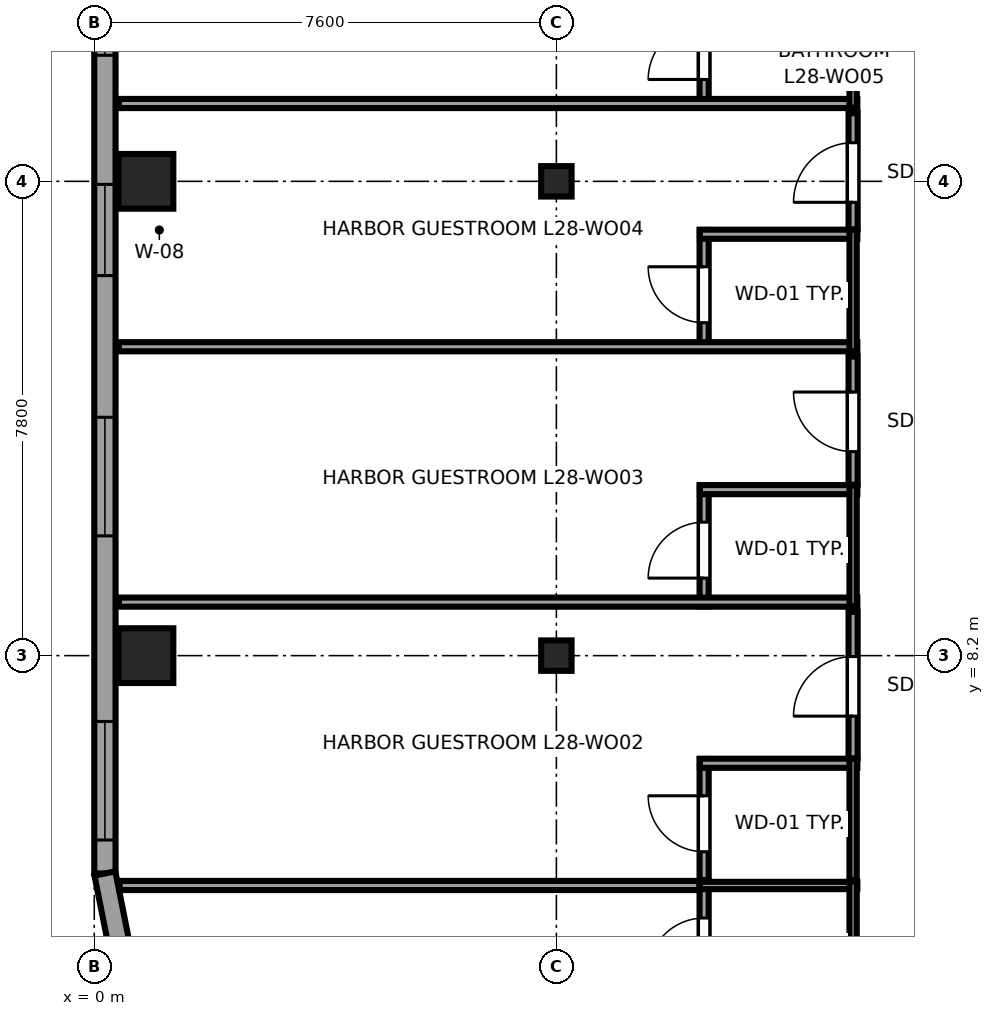
"""IFC4 building model, lengths in metres.
Left out: names, types, materials, properties, quantities, classifications, styles, units other than length and angle.
Written with IfcOpenShell. Run it as: python <this file> out.ifc"""

import sys

from ifc_helpers import new_model, si_unit, direction, frame, frame_2d, origin, origin_2d, place, context, subcontext, project, spatial, rectangle, i_section, extrude, source, transform, mapped, element, fill, save


model = new_model("IFC4")
c1 = context("Model", 3, precision=1e-05, world=origin(), true_north=direction((0.0, 1.0)))
c2 = subcontext(c1, "Body", "Model", "MODEL_VIEW")
j1 = project(units=[si_unit("LENGTHUNIT", "METRE"), si_unit("PLANEANGLEUNIT", "RADIAN")], contexts=[c1])
p1 = place(None, origin())
s1 = spatial("IfcSite", under=j1, at=p1, CompositionType="ELEMENT")
p2 = place(p1, origin())
s2 = spatial("IfcBuilding", under=s1, at=p2, CompositionType="ELEMENT")
p3 = place(p2, frame((0.0, 0.0, 111.55)))
s3 = spatial("IfcBuildingStorey", under=s2, at=p3, CompositionType="ELEMENT", Elevation=111.55)
m1 = source(origin(), c2, "Body", "SweptSolid", [
    extrude(rectangle(XDim=0.9, YDim=0.9, at=origin_2d()), origin(), (0.0, 0.0, 1.0), 3.55),
])
for number, where, z_axis, x_axis in (
    (1, (0.85, 8.2, 0.0), (0.0, 0.0, 1.0), (1.0, 0.0, 0.0)),
    (2, (0.85, 16.0, 0.0), (0.0, 0.0, 1.0), (1.0, 0.0, 0.0)),
):
    element("IfcColumn", number, at=place(p3, frame(where, z_axis=z_axis, x_axis=x_axis)), inside=s3, PredefinedType="COLUMN", context=c2, shape_type="MappedRepresentation", body=[
        mapped(m1, transform((0.0, 0.0, 0.0), x_axis=(1.0, 0.0, 0.0), y_axis=(0.0, 1.0, 0.0), z_axis=(0.0, 0.0, 1.0), scale=1.0)),
    ])
m2 = source(origin(), c2, "Body", "SweptSolid", [
    extrude(i_section(OverallWidth=0.5, OverallDepth=0.5, WebThickness=0.022, FlangeThickness=0.034, at=origin_2d()), origin(), (0.0, 0.0, 1.0), 3.55),
])
for number, where, z_axis, x_axis in (
    (3, (7.6, 8.2, 0.0), (0.0, 0.0, 1.0), (1.0, 0.0, 0.0)),
    (4, (7.6, 16.0, 0.0), (0.0, 0.0, 1.0), (1.0, 0.0, 0.0)),
):
    element("IfcColumn", number, at=place(p3, frame(where, z_axis=z_axis, x_axis=x_axis)), inside=s3, PredefinedType="COLUMN", context=c2, shape_type="MappedRepresentation", body=[
        mapped(m2, transform((0.0, 0.0, 0.0), x_axis=(1.0, 0.0, 0.0), y_axis=(0.0, 1.0, 0.0), z_axis=(0.0, 0.0, 1.0), scale=1.0)),
    ])
p4 = place(p3, frame((0.175, 41.383, 0.0), z_axis=(0.0, 0.0, 1.0), x_axis=(0.0, -1.0, 0.0)))
e5 = element("IfcWall", 5, at=p4, inside=s3, PredefinedType="SOLIDWALL", context=c2, shape_type="SweptSolid", body=[
    extrude(rectangle(XDim=36.766, YDim=0.35, at=frame_2d((18.383, 0.0))), origin(), (0.0, 0.0, 1.0), 3.37),
])
p5 = place(p4, frame((0.551, 0.0, 0.68)))
e6 = element("IfcOpeningElement", 6, at=p5, cuts=e5, PredefinedType="OPENING", context=c2, shape_type="SweptSolid", body=[
    extrude(rectangle(XDim=1.95, YDim=1.82, at=frame_2d((0.975, 0.91))), frame((0.0, 0.185, 0.0), z_axis=(0.0, -1.0, 0.0), x_axis=(1.0, 0.0, 0.0)), (0.0, 0.0, 1.0), 0.37),
])
p6 = place(p4, frame((4.503, 0.0, 0.68)))
e7 = element("IfcOpeningElement", 7, at=p6, cuts=e5, PredefinedType="OPENING", context=c2, shape_type="SweptSolid", body=[
    extrude(rectangle(XDim=1.95, YDim=1.82, at=frame_2d((0.975, 0.91))), frame((0.0, 0.185, 0.0), z_axis=(0.0, -1.0, 0.0), x_axis=(1.0, 0.0, 0.0)), (0.0, 0.0, 1.0), 0.37),
])
p7 = place(p4, frame((10.554, 0.0, 0.68)))
e8 = element("IfcOpeningElement", 8, at=p7, cuts=e5, PredefinedType="OPENING", context=c2, shape_type="SweptSolid", body=[
    extrude(rectangle(XDim=1.95, YDim=1.82, at=frame_2d((0.975, 0.91))), frame((0.0, 0.185, 0.0), z_axis=(0.0, -1.0, 0.0), x_axis=(1.0, 0.0, 0.0)), (0.0, 0.0, 1.0), 0.37),
])
p8 = place(p4, frame((13.456, 0.0, 0.68)))
e9 = element("IfcOpeningElement", 9, at=p8, cuts=e5, PredefinedType="OPENING", context=c2, shape_type="SweptSolid", body=[
    extrude(rectangle(XDim=1.95, YDim=1.82, at=frame_2d((0.975, 0.91))), frame((0.0, 0.185, 0.0), z_axis=(0.0, -1.0, 0.0), x_axis=(1.0, 0.0, 0.0)), (0.0, 0.0, 1.0), 0.37),
])
p9 = place(p4, frame((21.36, 0.0, 0.68)))
e10 = element("IfcOpeningElement", 10, at=p9, cuts=e5, PredefinedType="OPENING", context=c2, shape_type="SweptSolid", body=[
    extrude(rectangle(XDim=1.95, YDim=1.82, at=frame_2d((0.975, 0.91))), frame((0.0, 0.185, 0.0), z_axis=(0.0, -1.0, 0.0), x_axis=(1.0, 0.0, 0.0)), (0.0, 0.0, 1.0), 0.37),
])
p10 = place(p4, frame((29.263, 0.0, 0.68)))
e11 = element("IfcOpeningElement", 11, at=p10, cuts=e5, PredefinedType="OPENING", context=c2, shape_type="SweptSolid", body=[
    extrude(rectangle(XDim=1.95, YDim=1.82, at=frame_2d((0.975, 0.91))), frame((0.0, 0.185, 0.0), z_axis=(0.0, -1.0, 0.0), x_axis=(1.0, 0.0, 0.0)), (0.0, 0.0, 1.0), 0.37),
])
p11 = place(p4, frame((34.265, 0.0, 0.68)))
e12 = element("IfcOpeningElement", 12, at=p11, cuts=e5, PredefinedType="OPENING", context=c2, shape_type="SweptSolid", body=[
    extrude(rectangle(XDim=1.95, YDim=1.82, at=frame_2d((0.975, 0.91))), frame((0.0, 0.185, 0.0), z_axis=(0.0, -1.0, 0.0), x_axis=(1.0, 0.0, 0.0)), (0.0, 0.0, 1.0), 0.37),
])
p12 = place(p4, frame((25.433, 0.0, 0.62)))
e13 = element("IfcOpeningElement", 13, at=p12, cuts=e5, PredefinedType="OPENING", context=c2, shape_type="SweptSolid", body=[
    extrude(rectangle(XDim=1.5, YDim=1.55, at=frame_2d((0.75, 0.775))), frame((0.0, 0.185, 0.0), z_axis=(0.0, -1.0, 0.0), x_axis=(1.0, 0.0, 0.0)), (0.0, 0.0, 1.0), 0.37),
])
p13 = place(p3, frame((0.175, 4.617, 0.0), z_axis=(0.0, 0.0, 1.0), x_axis=(0.195011420161, -0.980800971659, 0.0)))
e14 = element("IfcWall", 14, at=p13, inside=s3, PredefinedType="SOLIDWALL", context=c2, shape_type="SweptSolid", body=[
    extrude(rectangle(XDim=1.743, YDim=0.35, at=frame_2d((0.871, 0.0))), origin(), (0.0, 0.0, 1.0), 3.37),
])
p14 = place(p3, frame((10.03, 2.5, 0.0), z_axis=(0.0, 0.0, 1.0), x_axis=(0.0, 1.0, 0.0)))
e15 = element("IfcWall", 15, at=p14, inside=s3, PredefinedType="PARTITIONING", context=c2, shape_type="SweptSolid", body=[
    extrude(rectangle(XDim=1.99, YDim=0.15, at=frame_2d((0.995, 0.0))), origin(), (0.0, 0.0, 1.0), 3.37),
])
p15 = place(p14, frame((0.465, 0.0, 0.0)))
e16 = element("IfcOpeningElement", 16, at=p15, cuts=e15, PredefinedType="OPENING", context=c2, shape_type="SweptSolid", body=[
    extrude(rectangle(XDim=0.92, YDim=2.01, at=frame_2d((0.46, 1.005))), frame((0.0, 0.085, 0.0), z_axis=(0.0, -1.0, 0.0), x_axis=(1.0, 0.0, 0.0)), (0.0, 0.0, 1.0), 0.17),
])
p16 = place(p3, frame((9.96, 4.42, 0.0), z_axis=(0.0, 0.0, 1.0), x_axis=(1.0, 0.0, 0.0)))
e17 = element("IfcWall", 17, at=p16, inside=s3, PredefinedType="PLUMBINGWALL", context=c2, shape_type="SweptSolid", body=[
    extrude(rectangle(XDim=2.59, YDim=0.12, at=frame_2d((1.295, 0.0))), origin(), (0.0, 0.0, 1.0), 3.37),
])
p17 = place(p3, frame((12.48, 2.5, 0.0), z_axis=(0.0, 0.0, 1.0), x_axis=(0.0, 1.0, 0.0)))
e18 = element("IfcWall", 18, at=p17, inside=s3, PredefinedType="PLUMBINGWALL", context=c2, shape_type="SweptSolid", body=[
    extrude(rectangle(XDim=1.99, YDim=0.12, at=frame_2d((0.995, 0.0))), origin(), (0.0, 0.0, 1.0), 3.37),
])
p18 = place(p3, frame((10.03, 4.51, 0.0), z_axis=(0.0, 0.0, 1.0), x_axis=(0.0, 1.0, 0.0)))
e19 = element("IfcWall", 19, at=p18, inside=s3, PredefinedType="PARTITIONING", context=c2, shape_type="SweptSolid", body=[
    extrude(rectangle(XDim=1.99, YDim=0.15, at=frame_2d((0.995, 0.0))), origin(), (0.0, 0.0, 1.0), 3.37),
])
p19 = place(p18, frame((0.465, 0.0, 0.0)))
e20 = element("IfcOpeningElement", 20, at=p19, cuts=e19, PredefinedType="OPENING", context=c2, shape_type="SweptSolid", body=[
    extrude(rectangle(XDim=0.92, YDim=2.01, at=frame_2d((0.46, 1.005))), frame((0.0, 0.085, 0.0), z_axis=(0.0, -1.0, 0.0), x_axis=(1.0, 0.0, 0.0)), (0.0, 0.0, 1.0), 0.17),
])
p20 = place(p3, frame((9.96, 6.43, 0.0), z_axis=(0.0, 0.0, 1.0), x_axis=(1.0, 0.0, 0.0)))
e21 = element("IfcWall", 21, at=p20, inside=s3, PredefinedType="PARTITIONING", context=c2, shape_type="SweptSolid", body=[
    extrude(rectangle(XDim=2.59, YDim=0.15, at=frame_2d((1.295, 0.0))), origin(), (0.0, 0.0, 1.0), 3.37),
])
p21 = place(p3, frame((12.48, 4.51, 0.0), z_axis=(0.0, 0.0, 1.0), x_axis=(0.0, 1.0, 0.0)))
e22 = element("IfcWall", 22, at=p21, inside=s3, PredefinedType="PLUMBINGWALL", context=c2, shape_type="SweptSolid", body=[
    extrude(rectangle(XDim=1.99, YDim=0.12, at=frame_2d((0.995, 0.0))), origin(), (0.0, 0.0, 1.0), 3.37),
])
p22 = place(p3, frame((10.03, 9.01, 0.0), z_axis=(0.0, 0.0, 1.0), x_axis=(0.0, 1.0, 0.0)))
e23 = element("IfcWall", 23, at=p22, inside=s3, PredefinedType="PARTITIONING", context=c2, shape_type="SweptSolid", body=[
    extrude(rectangle(XDim=1.99, YDim=0.15, at=frame_2d((0.995, 0.0))), origin(), (0.0, 0.0, 1.0), 3.37),
])
p23 = place(p22, frame((0.465, 0.0, 0.0)))
e24 = element("IfcOpeningElement", 24, at=p23, cuts=e23, PredefinedType="OPENING", context=c2, shape_type="SweptSolid", body=[
    extrude(rectangle(XDim=0.92, YDim=2.01, at=frame_2d((0.46, 1.005))), frame((0.0, 0.085, 0.0), z_axis=(0.0, -1.0, 0.0), x_axis=(1.0, 0.0, 0.0)), (0.0, 0.0, 1.0), 0.17),
])
p24 = place(p3, frame((0.405, 9.08, 0.0), z_axis=(0.0, 0.0, 1.0), x_axis=(1.0, 0.0, 0.0)))
e25 = element("IfcWall", 25, at=p24, inside=s3, PredefinedType="PARTITIONING", context=c2, shape_type="SweptSolid", body=[
    extrude(rectangle(XDim=12.145, YDim=0.15, at=frame_2d((6.073, 0.0))), origin(), (0.0, 0.0, 1.0), 3.37),
])
p25 = place(p3, frame((9.96, 10.93, 0.0), z_axis=(0.0, 0.0, 1.0), x_axis=(1.0, 0.0, 0.0)))
e26 = element("IfcWall", 26, at=p25, inside=s3, PredefinedType="PARTITIONING", context=c2, shape_type="SweptSolid", body=[
    extrude(rectangle(XDim=2.59, YDim=0.15, at=frame_2d((1.295, 0.0))), origin(), (0.0, 0.0, 1.0), 3.37),
])
p26 = place(p3, frame((12.48, 9.01, 0.0), z_axis=(0.0, 0.0, 1.0), x_axis=(0.0, 1.0, 0.0)))
e27 = element("IfcWall", 27, at=p26, inside=s3, PredefinedType="PLUMBINGWALL", context=c2, shape_type="SweptSolid", body=[
    extrude(rectangle(XDim=1.99, YDim=0.12, at=frame_2d((0.995, 0.0))), origin(), (0.0, 0.0, 1.0), 3.37),
])
p27 = place(p3, frame((10.03, 13.21, 0.0), z_axis=(0.0, 0.0, 1.0), x_axis=(0.0, 1.0, 0.0)))
e28 = element("IfcWall", 28, at=p27, inside=s3, PredefinedType="PARTITIONING", context=c2, shape_type="SweptSolid", body=[
    extrude(rectangle(XDim=1.99, YDim=0.15, at=frame_2d((0.995, 0.0))), origin(), (0.0, 0.0, 1.0), 3.37),
])
p28 = place(p27, frame((0.465, 0.0, 0.0)))
e29 = element("IfcOpeningElement", 29, at=p28, cuts=e28, PredefinedType="OPENING", context=c2, shape_type="SweptSolid", body=[
    extrude(rectangle(XDim=0.92, YDim=2.01, at=frame_2d((0.46, 1.005))), frame((0.0, 0.085, 0.0), z_axis=(0.0, -1.0, 0.0), x_axis=(1.0, 0.0, 0.0)), (0.0, 0.0, 1.0), 0.17),
])
p29 = place(p3, frame((0.405, 13.28, 0.0), z_axis=(0.0, 0.0, 1.0), x_axis=(1.0, 0.0, 0.0)))
e30 = element("IfcWall", 30, at=p29, inside=s3, PredefinedType="PARTITIONING", context=c2, shape_type="SweptSolid", body=[
    extrude(rectangle(XDim=12.145, YDim=0.15, at=frame_2d((6.073, 0.0))), origin(), (0.0, 0.0, 1.0), 3.37),
])
p30 = place(p3, frame((9.96, 15.13, 0.0), z_axis=(0.0, 0.0, 1.0), x_axis=(1.0, 0.0, 0.0)))
e31 = element("IfcWall", 31, at=p30, inside=s3, PredefinedType="PARTITIONING", context=c2, shape_type="SweptSolid", body=[
    extrude(rectangle(XDim=2.59, YDim=0.15, at=frame_2d((1.295, 0.0))), origin(), (0.0, 0.0, 1.0), 3.37),
])
p31 = place(p3, frame((12.48, 13.21, 0.0), z_axis=(0.0, 0.0, 1.0), x_axis=(0.0, 1.0, 0.0)))
e32 = element("IfcWall", 32, at=p31, inside=s3, PredefinedType="PLUMBINGWALL", context=c2, shape_type="SweptSolid", body=[
    extrude(rectangle(XDim=1.99, YDim=0.12, at=frame_2d((0.995, 0.0))), origin(), (0.0, 0.0, 1.0), 3.37),
])
p32 = place(p3, frame((10.03, 17.21, 0.0), z_axis=(0.0, 0.0, 1.0), x_axis=(0.0, 1.0, 0.0)))
e33 = element("IfcWall", 33, at=p32, inside=s3, PredefinedType="PARTITIONING", context=c2, shape_type="SweptSolid", body=[
    extrude(rectangle(XDim=1.99, YDim=0.15, at=frame_2d((0.995, 0.0))), origin(), (0.0, 0.0, 1.0), 3.37),
])
p33 = place(p32, frame((0.465, 0.0, 0.0)))
e34 = element("IfcOpeningElement", 34, at=p33, cuts=e33, PredefinedType="OPENING", context=c2, shape_type="SweptSolid", body=[
    extrude(rectangle(XDim=0.92, YDim=2.01, at=frame_2d((0.46, 1.005))), frame((0.0, 0.085, 0.0), z_axis=(0.0, -1.0, 0.0), x_axis=(1.0, 0.0, 0.0)), (0.0, 0.0, 1.0), 0.17),
])
p34 = place(p3, frame((0.405, 17.28, 0.0), z_axis=(0.0, 0.0, 1.0), x_axis=(1.0, 0.0, 0.0)))
e35 = element("IfcWall", 35, at=p34, inside=s3, PredefinedType="PARTITIONING", context=c2, shape_type="SweptSolid", body=[
    extrude(rectangle(XDim=12.145, YDim=0.15, at=frame_2d((6.073, 0.0))), origin(), (0.0, 0.0, 1.0), 3.37),
])
p35 = place(p3, frame((12.48, 17.21, 0.0), z_axis=(0.0, 0.0, 1.0), x_axis=(0.0, 1.0, 0.0)))
e36 = element("IfcWall", 36, at=p35, inside=s3, PredefinedType="PLUMBINGWALL", context=c2, shape_type="SweptSolid", body=[
    extrude(rectangle(XDim=1.99, YDim=0.12, at=frame_2d((0.995, 0.0))), origin(), (0.0, 0.0, 1.0), 3.37),
])
p36 = place(p3, frame((0.417, 4.42, 0.0), z_axis=(0.0, 0.0, 1.0), x_axis=(1.0, 0.0, 0.0)))
e37 = element("IfcWall", 37, at=p36, inside=s3, PredefinedType="PARTITIONING", context=c2, shape_type="SweptSolid", body=[
    extrude(rectangle(XDim=9.533, YDim=0.15, at=frame_2d((4.767, 0.0))), origin(), (0.0, 0.0, 1.0), 3.37),
])
p37 = place(p3, frame((12.48, 6.51, 0.0), z_axis=(0.0, 0.0, 1.0), x_axis=(0.0, 1.0, 0.0)))
e38 = element("IfcWall", 38, at=p37, inside=s3, PredefinedType="PARTITIONING", context=c2, shape_type="SweptSolid", body=[
    extrude(rectangle(XDim=2.41, YDim=0.15, at=frame_2d((1.205, 0.0))), origin(), (0.0, 0.0, 1.0), 3.37),
])
p38 = place(p37, frame((0.695, 0.0, 0.0)))
e39 = element("IfcOpeningElement", 39, at=p38, cuts=e38, PredefinedType="OPENING", context=c2, shape_type="SweptSolid", body=[
    extrude(rectangle(XDim=0.98, YDim=2.12, at=frame_2d((0.49, 1.06))), frame((0.0, 0.085, 0.0), z_axis=(0.0, -1.0, 0.0), x_axis=(1.0, 0.0, 0.0)), (0.0, 0.0, 1.0), 0.17),
])
p39 = place(p3, frame((12.48, 11.01, 0.0), z_axis=(0.0, 0.0, 1.0), x_axis=(0.0, 1.0, 0.0)))
e40 = element("IfcWall", 40, at=p39, inside=s3, PredefinedType="PARTITIONING", context=c2, shape_type="SweptSolid", body=[
    extrude(rectangle(XDim=2.11, YDim=0.15, at=frame_2d((1.055, 0.0))), origin(), (0.0, 0.0, 1.0), 3.37),
])
p40 = place(p39, frame((0.545, 0.0, 0.0)))
e41 = element("IfcOpeningElement", 41, at=p40, cuts=e40, PredefinedType="OPENING", context=c2, shape_type="SweptSolid", body=[
    extrude(rectangle(XDim=0.98, YDim=2.12, at=frame_2d((0.49, 1.06))), frame((0.0, 0.085, 0.0), z_axis=(0.0, -1.0, 0.0), x_axis=(1.0, 0.0, 0.0)), (0.0, 0.0, 1.0), 0.17),
])
p41 = place(p3, frame((12.48, 15.21, 0.0), z_axis=(0.0, 0.0, 1.0), x_axis=(0.0, 1.0, 0.0)))
e42 = element("IfcWall", 42, at=p41, inside=s3, PredefinedType="PARTITIONING", context=c2, shape_type="SweptSolid", body=[
    extrude(rectangle(XDim=1.91, YDim=0.15, at=frame_2d((0.955, 0.0))), origin(), (0.0, 0.0, 1.0), 3.37),
])
p42 = place(p41, frame((0.445, 0.0, 0.0)))
e43 = element("IfcOpeningElement", 43, at=p42, cuts=e42, PredefinedType="OPENING", context=c2, shape_type="SweptSolid", body=[
    extrude(rectangle(XDim=0.98, YDim=2.12, at=frame_2d((0.49, 1.06))), frame((0.0, 0.085, 0.0), z_axis=(0.0, -1.0, 0.0), x_axis=(1.0, 0.0, 0.0)), (0.0, 0.0, 1.0), 0.17),
])
m3 = source(origin(), c2, "Body", "SweptSolid", [
    extrude(rectangle(XDim=1.95, YDim=1.82, at=frame_2d((0.975, 0.91))), frame((0.0, 0.09, 0.0), z_axis=(0.0, -1.0, 0.0), x_axis=(1.0, 0.0, 0.0)), (0.0, 0.0, 1.0), 0.06),
])
p43 = place(p9, origin())
e44 = element("IfcWindow", 44, at=p43, inside=s3, PartitioningType="DOUBLE_PANEL_VERTICAL", PredefinedType="WINDOW", context=c2, shape_type="MappedRepresentation", body=[
    mapped(m3, transform((0.0, 0.0, 0.0), x_axis=(1.0, 0.0, 0.0), y_axis=(0.0, 1.0, 0.0), z_axis=(0.0, 0.0, 1.0), scale=1.0)),
])
fill(e10, e44)
p44 = place(p10, origin())
e45 = element("IfcWindow", 45, at=p44, inside=s3, PartitioningType="DOUBLE_PANEL_VERTICAL", PredefinedType="WINDOW", context=c2, shape_type="MappedRepresentation", body=[
    mapped(m3, transform((0.0, 0.0, 0.0), x_axis=(1.0, 0.0, 0.0), y_axis=(0.0, 1.0, 0.0), z_axis=(0.0, 0.0, 1.0), scale=1.0)),
])
fill(e11, e45)
p45 = place(p11, origin())
e46 = element("IfcWindow", 46, at=p45, inside=s3, PartitioningType="DOUBLE_PANEL_VERTICAL", PredefinedType="WINDOW", context=c2, shape_type="MappedRepresentation", body=[
    mapped(m3, transform((0.0, 0.0, 0.0), x_axis=(1.0, 0.0, 0.0), y_axis=(0.0, 1.0, 0.0), z_axis=(0.0, 0.0, 1.0), scale=1.0)),
])
fill(e12, e46)
m4 = source(origin(), c2, "Body", "SweptSolid", [
    extrude(rectangle(XDim=1.5, YDim=1.55, at=frame_2d((0.75, 0.775))), frame((0.0, 0.09, 0.0), z_axis=(0.0, -1.0, 0.0), x_axis=(1.0, 0.0, 0.0)), (0.0, 0.0, 1.0), 0.06),
])
p46 = place(p12, origin())
e47 = element("IfcWindow", 47, at=p46, inside=s3, PartitioningType="SINGLE_PANEL", PredefinedType="WINDOW", context=c2, shape_type="MappedRepresentation", body=[
    mapped(m4, transform((0.0, 0.0, 0.0), x_axis=(1.0, 0.0, 0.0), y_axis=(0.0, 1.0, 0.0), z_axis=(0.0, 0.0, 1.0), scale=1.0)),
])
fill(e13, e47)
m5 = source(origin(), c2, "Body", "SweptSolid", [
    extrude(rectangle(XDim=0.92, YDim=2.01, at=frame_2d((0.46, 1.005))), frame((0.0, 0.025, 0.0), z_axis=(0.0, -1.0, 0.0), x_axis=(1.0, 0.0, 0.0)), (0.0, 0.0, 1.0), 0.05),
])
p47 = place(p15, origin())
e48 = element("IfcDoor", 48, at=p47, inside=s3, OperationType="SINGLE_SWING_LEFT", PredefinedType="DOOR", context=c2, shape_type="MappedRepresentation", body=[
    mapped(m5, transform((0.0, 0.0, 0.0), x_axis=(1.0, 0.0, 0.0), y_axis=(0.0, 1.0, 0.0), z_axis=(0.0, 0.0, 1.0), scale=1.0)),
])
fill(e16, e48)
p48 = place(p19, origin())
e49 = element("IfcDoor", 49, at=p48, inside=s3, OperationType="SINGLE_SWING_RIGHT", PredefinedType="DOOR", context=c2, shape_type="MappedRepresentation", body=[
    mapped(m5, transform((0.0, 0.0, 0.0), x_axis=(1.0, 0.0, 0.0), y_axis=(0.0, 1.0, 0.0), z_axis=(0.0, 0.0, 1.0), scale=1.0)),
])
fill(e20, e49)
p49 = place(p23, origin())
e50 = element("IfcDoor", 50, at=p49, inside=s3, OperationType="SINGLE_SWING_LEFT", PredefinedType="DOOR", context=c2, shape_type="MappedRepresentation", body=[
    mapped(m5, transform((0.0, 0.0, 0.0), x_axis=(1.0, 0.0, 0.0), y_axis=(0.0, 1.0, 0.0), z_axis=(0.0, 0.0, 1.0), scale=1.0)),
])
fill(e24, e50)
p50 = place(p28, origin())
e51 = element("IfcDoor", 51, at=p50, inside=s3, OperationType="SINGLE_SWING_RIGHT", PredefinedType="DOOR", context=c2, shape_type="MappedRepresentation", body=[
    mapped(m5, transform((0.0, 0.0, 0.0), x_axis=(1.0, 0.0, 0.0), y_axis=(0.0, 1.0, 0.0), z_axis=(0.0, 0.0, 1.0), scale=1.0)),
])
fill(e29, e51)
p51 = place(p33, origin())
e52 = element("IfcDoor", 52, at=p51, inside=s3, OperationType="SINGLE_SWING_LEFT", PredefinedType="DOOR", context=c2, shape_type="MappedRepresentation", body=[
    mapped(m5, transform((0.0, 0.0, 0.0), x_axis=(1.0, 0.0, 0.0), y_axis=(0.0, 1.0, 0.0), z_axis=(0.0, 0.0, 1.0), scale=1.0)),
])
fill(e34, e52)
m6 = source(origin(), c2, "Body", "SweptSolid", [
    extrude(rectangle(XDim=0.98, YDim=2.12, at=frame_2d((0.49, 1.06))), frame((0.0, 0.025, 0.0), z_axis=(0.0, -1.0, 0.0), x_axis=(1.0, 0.0, 0.0)), (0.0, 0.0, 1.0), 0.05),
])
p52 = place(p38, origin())
e53 = element("IfcDoor", 53, at=p52, inside=s3, OperationType="SINGLE_SWING_LEFT", PredefinedType="DOOR", context=c2, shape_type="MappedRepresentation", body=[
    mapped(m6, transform((0.0, 0.0, 0.0), x_axis=(1.0, 0.0, 0.0), y_axis=(0.0, 1.0, 0.0), z_axis=(0.0, 0.0, 1.0), scale=1.0)),
])
fill(e39, e53)
p53 = place(p40, origin())
e54 = element("IfcDoor", 54, at=p53, inside=s3, OperationType="SINGLE_SWING_RIGHT", PredefinedType="DOOR", context=c2, shape_type="MappedRepresentation", body=[
    mapped(m6, transform((0.0, 0.0, 0.0), x_axis=(1.0, 0.0, 0.0), y_axis=(0.0, 1.0, 0.0), z_axis=(0.0, 0.0, 1.0), scale=1.0)),
])
fill(e41, e54)
p54 = place(p42, origin())
e55 = element("IfcDoor", 55, at=p54, inside=s3, OperationType="SINGLE_SWING_LEFT", PredefinedType="DOOR", context=c2, shape_type="MappedRepresentation", body=[
    mapped(m6, transform((0.0, 0.0, 0.0), x_axis=(1.0, 0.0, 0.0), y_axis=(0.0, 1.0, 0.0), z_axis=(0.0, 0.0, 1.0), scale=1.0)),
])
fill(e43, e55)
save(model, sys.argv[1])
